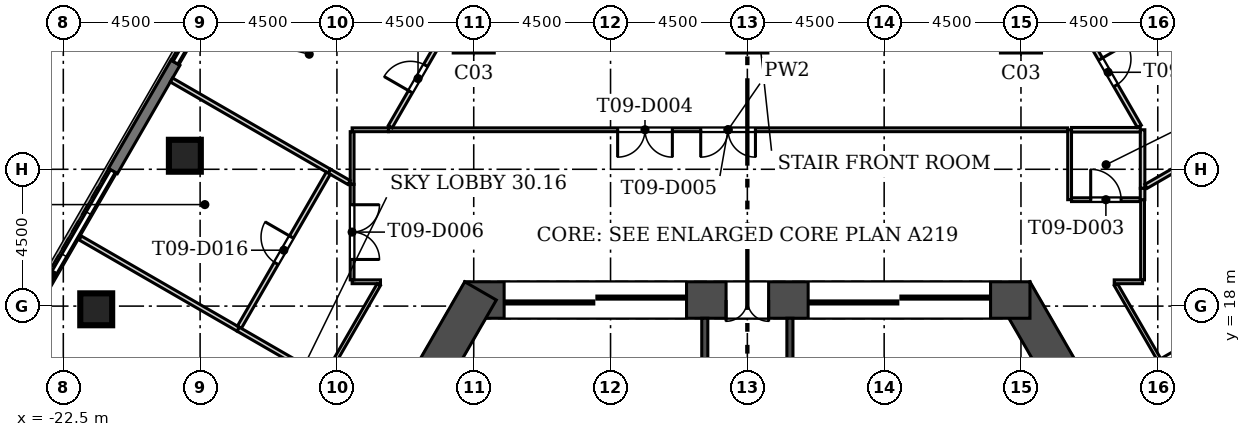
"""IFC4 building model, lengths in metres.
Left out: names, types, materials, properties, quantities, classifications, styles, units other than length and angle.
Written with IfcOpenShell. Run it as: python <this file> out.ifc"""

import sys

from ifc_helpers import new_model, si_unit, direction, frame, frame_2d, origin, origin_2d, place, context, subcontext, project, spatial, rectangle, extrude, element, fill, save


model = new_model("IFC4")
c1 = context("Model", 3, precision=1e-05, world=origin(), true_north=direction((0.0, 1.0)))
c2 = subcontext(c1, "Body", "Model", "MODEL_VIEW")
j1 = project(units=[si_unit("LENGTHUNIT", "METRE"), si_unit("PLANEANGLEUNIT", "RADIAN")], contexts=[c1])
p1 = place(None, origin())
s1 = spatial("IfcSite", under=j1, at=p1, CompositionType="ELEMENT")
p2 = place(p1, origin())
s2 = spatial("IfcBuilding", under=s1, at=p2, CompositionType="ELEMENT")
p3 = place(p2, frame((0.0, 0.0, 137.5)))
s3 = spatial("IfcBuildingStorey", under=s2, at=p3, CompositionType="ELEMENT", Elevation=137.5)
for number, where, z_axis, x_axis in (
    (1, (-18.502, 22.945, 0.0), (0.0, 0.0, 1.0), (1.0, 0.0, 0.0)),
    (2, (-21.417, 17.895, 0.0), (0.0, 0.0, 1.0), (1.0, 0.0, 0.0)),
):
    element("IfcColumn", number, at=place(p3, frame(where, z_axis=z_axis, x_axis=x_axis)), inside=s3, PredefinedType="COLUMN", context=c2, shape_type="SweptSolid", body=[
        extrude(rectangle(XDim=1.05, YDim=1.05, at=origin_2d()), origin(), (0.0, 0.0, 1.0), 5.4),
    ])
p4 = place(p3, frame((13.281, 10.699, 0.0), z_axis=(0.0, 0.0, 1.0), x_axis=(-0.499998513025, 0.866026262288, 0.0)))
e3 = element("IfcWall", 3, at=p4, inside=s3, PredefinedType="SHEAR", context=c2, shape_type="SweptSolid", body=[
    extrude(rectangle(XDim=9.008, YDim=1.2, at=frame_2d((4.504, 0.0))), origin(), (0.0, 0.0, 1.0), 5.4),
])
p5 = place(p3, frame((9.296, 18.2, 0.0), z_axis=(0.0, 0.0, 1.0), x_axis=(-1.0, 0.0, 0.0)))
e4 = element("IfcWall", 4, at=p5, inside=s3, PredefinedType="SHEAR", context=c2, shape_type="SweptSolid", body=[
    extrude(rectangle(XDim=18.592, YDim=1.2, at=frame_2d((9.296, 0.0))), origin(), (0.0, 0.0, 1.0), 5.4),
])
p6 = place(p5, frame((8.596, 0.0, 0.0)))
e5 = element("IfcOpeningElement", 5, at=p6, cuts=e4, PredefinedType="OPENING", context=c2, shape_type="SweptSolid", body=[
    extrude(rectangle(XDim=1.4, YDim=2.1, at=frame_2d((0.7, 1.05))), frame((0.0, 0.61, 0.0), z_axis=(0.0, -1.0, 0.0), x_axis=(1.0, 0.0, 0.0)), (0.0, 0.0, 1.0), 1.22),
])
p7 = place(p5, frame((11.296, 0.0, 0.0)))
e6 = element("IfcOpeningElement", 6, at=p7, cuts=e4, PredefinedType="OPENING", context=c2, shape_type="SweptSolid", body=[
    extrude(rectangle(XDim=6.0, YDim=2.4, at=frame_2d((3.0, 1.2))), frame((0.0, 0.61, 0.0), z_axis=(0.0, -1.0, 0.0), x_axis=(1.0, 0.0, 0.0)), (0.0, 0.0, 1.0), 1.22),
])
p8 = place(p5, frame((1.296, 0.0, 0.0)))
e7 = element("IfcOpeningElement", 7, at=p8, cuts=e4, PredefinedType="OPENING", context=c2, shape_type="SweptSolid", body=[
    extrude(rectangle(XDim=6.0, YDim=2.4, at=frame_2d((3.0, 1.2))), frame((0.0, 0.61, 0.0), z_axis=(0.0, -1.0, 0.0), x_axis=(1.0, 0.0, 0.0)), (0.0, 0.0, 1.0), 1.22),
])
p9 = place(p3, frame((-8.777, 18.5, 0.0), z_axis=(0.0, 0.0, 1.0), x_axis=(-0.499998513025, -0.866026262288, 0.0)))
e8 = element("IfcWall", 8, at=p9, inside=s3, PredefinedType="SHEAR", context=c2, shape_type="SweptSolid", body=[
    extrude(rectangle(XDim=9.008, YDim=1.2, at=frame_2d((4.504, 0.0))), origin(), (0.0, 0.0, 1.0), 5.4),
])
p10 = place(p3, frame((-18.811, 26.004, 0.0), z_axis=(0.0, 0.0, 1.0), x_axis=(-0.499974107589, -0.866040352259, 0.0)))
e9 = element("IfcWall", 9, at=p10, inside=s3, PredefinedType="SOLIDWALL", context=c2, shape_type="SweptSolid", body=[
    extrude(rectangle(XDim=4.115, YDim=0.34, at=frame_2d((2.058, 0.0))), origin(), (0.0, 0.0, 1.0), 5.0),
])
p11 = place(p3, frame((-1.4, 5.85, -0.4), z_axis=(0.0, 0.0, 1.0), x_axis=(0.0, 1.0, 0.0)))
e10 = element("IfcWall", 10, at=p11, inside=s3, PredefinedType="SOLIDWALL", context=c2, shape_type="SweptSolid", body=[
    extrude(rectangle(XDim=11.75, YDim=0.2, at=frame_2d((5.875, 0.0))), origin(), (0.0, 0.0, 1.0), 5.4),
])
p12 = place(p11, frame((5.7, 0.0, 0.4)))
e11 = element("IfcOpeningElement", 11, at=p12, cuts=e10, PredefinedType="OPENING", context=c2, shape_type="SweptSolid", body=[
    extrude(rectangle(XDim=1.4, YDim=2.1, at=frame_2d((0.7, 1.05))), frame((0.0, 0.11, 0.0), z_axis=(0.0, -1.0, 0.0), x_axis=(1.0, 0.0, 0.0)), (0.0, 0.0, 1.0), 0.22),
])
p13 = place(p11, frame((8.3, 0.0, 0.4)))
e12 = element("IfcOpeningElement", 12, at=p13, cuts=e10, PredefinedType="OPENING", context=c2, shape_type="SweptSolid", body=[
    extrude(rectangle(XDim=1.4, YDim=2.1, at=frame_2d((0.7, 1.05))), frame((0.0, 0.11, 0.0), z_axis=(0.0, -1.0, 0.0), x_axis=(1.0, 0.0, 0.0)), (0.0, 0.0, 1.0), 0.22),
])
p14 = place(p11, frame((0.65, 0.0, 0.4)))
e13 = element("IfcOpeningElement", 13, at=p14, cuts=e10, PredefinedType="OPENING", context=c2, shape_type="SweptSolid", body=[
    extrude(rectangle(XDim=1.1, YDim=2.1, at=frame_2d((0.55, 1.05))), frame((0.0, 0.11, 0.0), z_axis=(0.0, -1.0, 0.0), x_axis=(1.0, 0.0, 0.0)), (0.0, 0.0, 1.0), 0.22),
])
p15 = place(p11, frame((3.3, 0.0, 0.4)))
e14 = element("IfcOpeningElement", 14, at=p15, cuts=e10, PredefinedType="OPENING", context=c2, shape_type="SweptSolid", body=[
    extrude(rectangle(XDim=1.0, YDim=2.1, at=frame_2d((0.5, 1.05))), frame((0.0, 0.11, 0.0), z_axis=(0.0, -1.0, 0.0), x_axis=(1.0, 0.0, 0.0)), (0.0, 0.0, 1.0), 0.22),
])
p16 = place(p3, frame((1.4, 5.85, -0.4), z_axis=(0.0, 0.0, 1.0), x_axis=(0.0, 1.0, 0.0)))
e15 = element("IfcWall", 15, at=p16, inside=s3, PredefinedType="SOLIDWALL", context=c2, shape_type="SweptSolid", body=[
    extrude(rectangle(XDim=11.75, YDim=0.2, at=frame_2d((5.875, 0.0))), origin(), (0.0, 0.0, 1.0), 5.4),
])
p17 = place(p16, frame((3.2, 0.0, 0.4)))
e16 = element("IfcOpeningElement", 16, at=p17, cuts=e15, PredefinedType="OPENING", context=c2, shape_type="SweptSolid", body=[
    extrude(rectangle(XDim=1.2, YDim=2.1, at=frame_2d((0.6, 1.05))), frame((0.0, 0.11, 0.0), z_axis=(0.0, -1.0, 0.0), x_axis=(1.0, 0.0, 0.0)), (0.0, 0.0, 1.0), 0.22),
])
p18 = place(p16, frame((5.7, 0.0, 0.4)))
e17 = element("IfcOpeningElement", 17, at=p18, cuts=e15, PredefinedType="OPENING", context=c2, shape_type="SweptSolid", body=[
    extrude(rectangle(XDim=1.4, YDim=2.1, at=frame_2d((0.7, 1.05))), frame((0.0, 0.11, 0.0), z_axis=(0.0, -1.0, 0.0), x_axis=(1.0, 0.0, 0.0)), (0.0, 0.0, 1.0), 0.22),
])
p19 = place(p16, frame((0.65, 0.0, 0.4)))
e18 = element("IfcOpeningElement", 18, at=p19, cuts=e15, PredefinedType="OPENING", context=c2, shape_type="SweptSolid", body=[
    extrude(rectangle(XDim=1.1, YDim=2.1, at=frame_2d((0.55, 1.05))), frame((0.0, 0.11, 0.0), z_axis=(0.0, -1.0, 0.0), x_axis=(1.0, 0.0, 0.0)), (0.0, 0.0, 1.0), 0.22),
])
p20 = place(p3, frame((12.122, 18.706, 0.0), z_axis=(0.0, 0.0, 1.0), x_axis=(0.499989655977, -0.866031375826, 0.0)))
e19 = element("IfcWall", 19, at=p20, inside=s3, PredefinedType="PARTITIONING", context=c2, shape_type="SweptSolid", body=[
    extrude(rectangle(XDim=6.697, YDim=0.125, at=frame_2d((3.348, 0.0))), origin(), (0.0, 0.0, 1.0), 5.0),
])
p21 = place(p20, frame((2.848, 0.0, 0.0)))
e20 = element("IfcOpeningElement", 20, at=p21, cuts=e19, PredefinedType="OPENING", context=c2, shape_type="SweptSolid", body=[
    extrude(rectangle(XDim=1.0, YDim=2.1, at=frame_2d((0.5, 1.05))), frame((0.0, 0.073, 0.0), z_axis=(0.0, -1.0, 0.0), x_axis=(1.0, 0.0, 0.0)), (0.0, 0.0, 1.0), 0.145),
])
p22 = place(p3, frame((10.6, 23.8, 0.0), z_axis=(0.0, 0.0, 1.0), x_axis=(0.0, -1.0, 0.0)))
e21 = element("IfcWall", 21, at=p22, inside=s3, PredefinedType="PARTITIONING", context=c2, shape_type="SweptSolid", body=[
    extrude(rectangle(XDim=2.3, YDim=0.125, at=frame_2d((1.15, 0.0))), origin(), (0.0, 0.0, 1.0), 5.0),
])
p23 = place(p3, frame((10.663, 21.5, 0.0), z_axis=(0.0, 0.0, 1.0), x_axis=(1.0, 0.0, 0.0)))
e22 = element("IfcWall", 22, at=p23, inside=s3, PredefinedType="PARTITIONING", context=c2, shape_type="SweptSolid", body=[
    extrude(rectangle(XDim=2.262, YDim=0.125, at=frame_2d((1.131, 0.0))), origin(), (0.0, 0.0, 1.0), 5.0),
])
p24 = place(p23, frame((0.631, 0.0, 0.0)))
e23 = element("IfcOpeningElement", 23, at=p24, cuts=e22, PredefinedType="OPENING", context=c2, shape_type="SweptSolid", body=[
    extrude(rectangle(XDim=1.0, YDim=2.1, at=frame_2d((0.5, 1.05))), frame((0.0, 0.073, 0.0), z_axis=(0.0, -1.0, 0.0), x_axis=(1.0, 0.0, 0.0)), (0.0, 0.0, 1.0), 0.145),
])
p25 = place(p3, frame((-11.804, 23.8, 0.0), z_axis=(0.0, 0.0, 1.0), x_axis=(1.0, 0.0, 0.0)))
e24 = element("IfcWall", 24, at=p25, inside=s3, PredefinedType="PARTITIONING", context=c2, shape_type="SweptSolid", body=[
    extrude(rectangle(XDim=22.342, YDim=0.125, at=frame_2d((11.171, 0.0))), origin(), (0.0, 0.0, 1.0), 5.0),
])
p26 = place(p25, frame((7.538, 0.0, 0.0)))
e25 = element("IfcOpeningElement", 25, at=p26, cuts=e24, PredefinedType="OPENING", context=c2, shape_type="SweptSolid", body=[
    extrude(rectangle(XDim=1.8, YDim=2.1, at=frame_2d((0.9, 1.05))), frame((0.0, 0.073, 0.0), z_axis=(0.0, -1.0, 0.0), x_axis=(1.0, 0.0, 0.0)), (0.0, 0.0, 1.0), 0.145),
])
p27 = place(p25, frame((10.271, 0.0, 0.0)))
e26 = element("IfcOpeningElement", 26, at=p27, cuts=e24, PredefinedType="OPENING", context=c2, shape_type="SweptSolid", body=[
    extrude(rectangle(XDim=1.8, YDim=2.1, at=frame_2d((0.9, 1.05))), frame((0.0, 0.073, 0.0), z_axis=(0.0, -1.0, 0.0), x_axis=(1.0, 0.0, 0.0)), (0.0, 0.0, 1.0), 0.145),
])
p28 = place(p3, frame((-13.0, 22.006, 0.0), z_axis=(0.0, 0.0, 1.0), x_axis=(0.0, 1.0, 0.0)))
e27 = element("IfcWall", 27, at=p28, inside=s3, PredefinedType="PARTITIONING", context=c2, shape_type="SweptSolid", body=[
    extrude(rectangle(XDim=1.732, YDim=0.125, at=frame_2d((0.866, 0.0))), origin(), (0.0, 0.0, 1.0), 5.0),
])
p29 = place(p3, frame((-13.0, 23.8, 0.0), z_axis=(0.0, 0.0, 1.0), x_axis=(1.0, 0.0, 0.0)))
e28 = element("IfcWall", 28, at=p29, inside=s3, PredefinedType="PARTITIONING", context=c2, shape_type="SweptSolid", body=[
    extrude(rectangle(XDim=1.196, YDim=0.125, at=frame_2d((0.598, 0.0))), origin(), (0.0, 0.0, 1.0), 5.0),
])
p30 = place(p3, frame((-12.067, 18.8, 0.0), z_axis=(0.0, 0.0, 1.0), x_axis=(-1.0, 0.0, 0.0)))
e29 = element("IfcWall", 29, at=p30, inside=s3, PredefinedType="PARTITIONING", context=c2, shape_type="SweptSolid", body=[
    extrude(rectangle(XDim=0.933, YDim=0.125, at=frame_2d((0.466, 0.0))), origin(), (0.0, 0.0, 1.0), 5.0),
])
p31 = place(p3, frame((-13.0, 18.863, 0.0), z_axis=(0.0, 0.0, 1.0), x_axis=(0.0, 1.0, 0.0)))
e30 = element("IfcWall", 30, at=p31, inside=s3, PredefinedType="PARTITIONING", context=c2, shape_type="SweptSolid", body=[
    extrude(rectangle(XDim=3.143, YDim=0.125, at=frame_2d((1.572, 0.0))), origin(), (0.0, 0.0, 1.0), 5.0),
])
p32 = place(p31, frame((0.672, 0.0, 0.0)))
e31 = element("IfcOpeningElement", 31, at=p32, cuts=e30, PredefinedType="OPENING", context=c2, shape_type="SweptSolid", body=[
    extrude(rectangle(XDim=1.8, YDim=2.1, at=frame_2d((0.9, 1.05))), frame((0.0, 0.073, 0.0), z_axis=(0.0, -1.0, 0.0), x_axis=(1.0, 0.0, 0.0)), (0.0, 0.0, 1.0), 0.145),
])
p33 = place(p3, frame((13.0, 21.5, 0.0), z_axis=(0.0, 0.0, 1.0), x_axis=(0.0, -1.0, 0.0)))
e32 = element("IfcWall", 32, at=p33, inside=s3, PredefinedType="PARTITIONING", context=c2, shape_type="SweptSolid", body=[
    extrude(rectangle(XDim=2.637, YDim=0.125, at=frame_2d((1.319, 0.0))), origin(), (0.0, 0.0, 1.0), 5.0),
])
p34 = place(p3, frame((13.0, 18.8, 0.0), z_axis=(0.0, 0.0, 1.0), x_axis=(-1.0, 0.0, 0.0)))
e33 = element("IfcWall", 33, at=p34, inside=s3, PredefinedType="PARTITIONING", context=c2, shape_type="SweptSolid", body=[
    extrude(rectangle(XDim=0.933, YDim=0.125, at=frame_2d((0.466, 0.0))), origin(), (0.0, 0.0, 1.0), 5.0),
])
p35 = place(p3, frame((-16.2, 11.642, 0.0), z_axis=(0.0, 0.0, 1.0), x_axis=(0.499989328978, 0.866031564614, 0.0)))
e34 = element("IfcWall", 34, at=p35, inside=s3, PredefinedType="PARTITIONING", context=c2, shape_type="SweptSolid", body=[
    extrude(rectangle(XDim=8.156, YDim=0.125, at=frame_2d((4.078, 0.0))), origin(), (0.0, 0.0, 1.0), 5.0),
])
p36 = place(p3, frame((13.0, 23.8, 0.0), z_axis=(0.0, 0.0, 1.0), x_axis=(0.0, -1.0, 0.0)))
e35 = element("IfcWall", 35, at=p36, inside=s3, PredefinedType="PARTITIONING", context=c2, shape_type="SweptSolid", body=[
    extrude(rectangle(XDim=1.927, YDim=0.15, at=frame_2d((0.964, 0.0))), origin(), (0.0, 0.0, 1.0), 5.0),
])
p37 = place(p3, frame((10.663, 23.8, 0.0), z_axis=(0.0, 0.0, 1.0), x_axis=(1.0, 0.0, 0.0)))
e36 = element("IfcWall", 36, at=p37, inside=s3, PredefinedType="PARTITIONING", context=c2, shape_type="SweptSolid", body=[
    extrude(rectangle(XDim=2.261, YDim=0.15, at=frame_2d((1.131, 0.0))), origin(), (0.0, 0.0, 1.0), 5.0),
])
p38 = place(p3, frame((13.0, 21.873, 0.0), z_axis=(0.0, 0.0, 1.0), x_axis=(0.0, -1.0, 0.0)))
e37 = element("IfcWall", 37, at=p38, inside=s3, PredefinedType="PARTITIONING", context=c2, shape_type="SweptSolid", body=[
    extrude(rectangle(XDim=0.373, YDim=0.15, at=frame_2d((0.187, 0.0))), origin(), (0.0, 0.0, 1.0), 5.0),
])
p39 = place(p3, frame((12.894, 23.913, 0.0), z_axis=(0.0, 0.0, 1.0), x_axis=(-0.499983290286, 0.866035050927, 0.0)))
e38 = element("IfcWall", 38, at=p39, inside=s3, PredefinedType="PARTITIONING", context=c2, shape_type="SweptSolid", body=[
    extrude(rectangle(XDim=4.105, YDim=0.15, at=frame_2d((2.053, 0.0))), origin(), (0.0, 0.0, 1.0), 5.0),
])
p40 = place(p39, frame((1.552, 0.0, 0.0)))
e39 = element("IfcOpeningElement", 39, at=p40, cuts=e38, PredefinedType="OPENING", context=c2, shape_type="SweptSolid", body=[
    extrude(rectangle(XDim=1.0, YDim=2.1, at=frame_2d((0.5, 1.05))), frame((0.0, 0.085, 0.0), z_axis=(0.0, -1.0, 0.0), x_axis=(1.0, 0.0, 0.0)), (0.0, 0.0, 1.0), 0.17),
])
p41 = place(p3, frame((19.0, 25.337, 0.0), z_axis=(0.0, 0.0, 1.0), x_axis=(-0.866028893315, -0.499993955907, 0.0)))
e40 = element("IfcWall", 40, at=p41, inside=s3, PredefinedType="PARTITIONING", context=c2, shape_type="SweptSolid", body=[
    extrude(rectangle(XDim=6.798, YDim=0.15, at=frame_2d((3.399, 0.0))), origin(), (0.0, 0.0, 1.0), 5.0),
])
p42 = place(p3, frame((-11.746, 23.9, 0.0), z_axis=(0.0, 0.0, 1.0), x_axis=(0.500001750229, 0.866024393287, 0.0)))
e41 = element("IfcWall", 41, at=p42, inside=s3, PredefinedType="PARTITIONING", context=c2, shape_type="SweptSolid", body=[
    extrude(rectangle(XDim=3.657, YDim=0.15, at=frame_2d((1.829, 0.0))), origin(), (0.0, 0.0, 1.0), 5.0),
])
p43 = place(p42, frame((1.329, 0.0, 0.0)))
e42 = element("IfcOpeningElement", 42, at=p43, cuts=e41, PredefinedType="OPENING", context=c2, shape_type="SweptSolid", body=[
    extrude(rectangle(XDim=1.0, YDim=2.1, at=frame_2d((0.5, 1.05))), frame((0.0, 0.085, 0.0), z_axis=(0.0, -1.0, 0.0), x_axis=(1.0, 0.0, 0.0)), (0.0, 0.0, 1.0), 0.17),
])
p44 = place(p3, frame((-13.746, 22.437, 0.0), z_axis=(0.0, 0.0, 1.0), x_axis=(-0.866020924479, 0.500007758305, 0.0)))
e43 = element("IfcWall", 43, at=p44, inside=s3, PredefinedType="PARTITIONING", context=c2, shape_type="SweptSolid", body=[
    extrude(rectangle(XDim=6.0, YDim=0.15, at=frame_2d((3.0, 0.0))), origin(), (0.0, 0.0, 1.0), 5.0),
])
p45 = place(p3, frame((-13.1, 22.064, 0.0), z_axis=(0.0, 0.0, 1.0), x_axis=(-0.866120184914, 0.499835798323, 0.0)))
e44 = element("IfcWall", 44, at=p45, inside=s3, PredefinedType="PARTITIONING", context=c2, shape_type="SweptSolid", body=[
    extrude(rectangle(XDim=0.746, YDim=0.15, at=frame_2d((0.373, 0.0))), origin(), (0.0, 0.0, 1.0), 5.0),
])
p46 = place(p3, frame((-16.746, 17.24, 0.0), z_axis=(0.0, 0.0, 1.0), x_axis=(-0.866020924479, 0.500007758305, 0.0)))
e45 = element("IfcWall", 45, at=p46, inside=s3, PredefinedType="PARTITIONING", context=c2, shape_type="SweptSolid", body=[
    extrude(rectangle(XDim=6.0, YDim=0.15, at=frame_2d((3.0, 0.0))), origin(), (0.0, 0.0, 1.0), 5.0),
])
p47 = place(p3, frame((-13.784, 22.372, 0.0), z_axis=(0.0, 0.0, 1.0), x_axis=(-0.500012662943, -0.866018092707, 0.0)))
e46 = element("IfcWall", 46, at=p47, inside=s3, PredefinedType="PARTITIONING", context=c2, shape_type="SweptSolid", body=[
    extrude(rectangle(XDim=5.85, YDim=0.15, at=frame_2d((2.925, 0.0))), origin(), (0.0, 0.0, 1.0), 5.0),
])
p48 = place(p47, frame((2.425, 0.0, 0.0)))
e47 = element("IfcOpeningElement", 47, at=p48, cuts=e46, PredefinedType="OPENING", context=c2, shape_type="SweptSolid", body=[
    extrude(rectangle(XDim=1.0, YDim=2.1, at=frame_2d((0.5, 1.05))), frame((0.0, 0.085, 0.0), z_axis=(0.0, -1.0, 0.0), x_axis=(1.0, 0.0, 0.0)), (0.0, 0.0, 1.0), 0.17),
])
p49 = place(p3, frame((-16.746, 17.24, 0.0), z_axis=(0.0, 0.0, 1.0), x_axis=(0.866010750942, -0.50002537861, 0.0)))
e48 = element("IfcWall", 48, at=p49, inside=s3, PredefinedType="PARTITIONING", context=c2, shape_type="SweptSolid", body=[
    extrude(rectangle(XDim=2.0, YDim=0.15, at=frame_2d((1.0, 0.0))), origin(), (0.0, 0.0, 1.0), 5.0),
])
p50 = place(p6, origin())
e49 = element("IfcDoor", 49, at=p50, inside=s3, OperationType="DOUBLE_DOOR_SINGLE_SWING", PredefinedType="DOOR", context=c2, shape_type="SweptSolid", body=[
    extrude(rectangle(XDim=1.4, YDim=2.1, at=frame_2d((0.7, 1.05))), frame((0.0, 0.025, 0.0), z_axis=(0.0, -1.0, 0.0), x_axis=(1.0, 0.0, 0.0)), (0.0, 0.0, 1.0), 0.05),
])
fill(e5, e49)
p51 = place(p7, origin())
e50 = element("IfcDoor", 50, at=p51, inside=s3, OperationType="DOUBLE_DOOR_SLIDING", PredefinedType="DOOR", context=c2, shape_type="SweptSolid", body=[
    extrude(rectangle(XDim=6.0, YDim=2.4, at=frame_2d((3.0, 1.2))), frame((0.0, 0.025, 0.0), z_axis=(0.0, -1.0, 0.0), x_axis=(1.0, 0.0, 0.0)), (0.0, 0.0, 1.0), 0.05),
])
fill(e6, e50)
p52 = place(p8, origin())
e51 = element("IfcDoor", 51, at=p52, inside=s3, OperationType="DOUBLE_DOOR_SLIDING", PredefinedType="DOOR", context=c2, shape_type="SweptSolid", body=[
    extrude(rectangle(XDim=6.0, YDim=2.4, at=frame_2d((3.0, 1.2))), frame((0.0, 0.025, 0.0), z_axis=(0.0, -1.0, 0.0), x_axis=(1.0, 0.0, 0.0)), (0.0, 0.0, 1.0), 0.05),
])
fill(e7, e51)
p53 = place(p24, origin())
e52 = element("IfcDoor", 52, at=p53, inside=s3, OperationType="SINGLE_SWING_LEFT", PredefinedType="DOOR", context=c2, shape_type="SweptSolid", body=[
    extrude(rectangle(XDim=1.0, YDim=2.1, at=frame_2d((0.5, 1.05))), frame((0.0, 0.025, 0.0), z_axis=(0.0, -1.0, 0.0), x_axis=(1.0, 0.0, 0.0)), (0.0, 0.0, 1.0), 0.05),
])
fill(e23, e52)
p54 = place(p26, frame((1.8, 0.0, 0.0), z_axis=(0.0, 0.0, 1.0), x_axis=(-1.0, 0.0, 0.0)))
e53 = element("IfcDoor", 53, at=p54, inside=s3, OperationType="DOUBLE_DOOR_SINGLE_SWING", PredefinedType="DOOR", context=c2, shape_type="SweptSolid", body=[
    extrude(rectangle(XDim=1.8, YDim=2.1, at=frame_2d((0.9, 1.05))), frame((0.0, 0.025, 0.0), z_axis=(0.0, -1.0, 0.0), x_axis=(1.0, 0.0, 0.0)), (0.0, 0.0, 1.0), 0.05),
])
fill(e25, e53)
p55 = place(p27, frame((1.8, 0.0, 0.0), z_axis=(0.0, 0.0, 1.0), x_axis=(-1.0, 0.0, 0.0)))
e54 = element("IfcDoor", 54, at=p55, inside=s3, OperationType="DOUBLE_DOOR_SINGLE_SWING", PredefinedType="DOOR", context=c2, shape_type="SweptSolid", body=[
    extrude(rectangle(XDim=1.8, YDim=2.1, at=frame_2d((0.9, 1.05))), frame((0.0, 0.025, 0.0), z_axis=(0.0, -1.0, 0.0), x_axis=(1.0, 0.0, 0.0)), (0.0, 0.0, 1.0), 0.05),
])
fill(e26, e54)
p56 = place(p32, frame((1.8, 0.0, 0.0), z_axis=(0.0, 0.0, 1.0), x_axis=(-1.0, 0.0, 0.0)))
e55 = element("IfcDoor", 55, at=p56, inside=s3, OperationType="DOUBLE_DOOR_SINGLE_SWING", PredefinedType="DOOR", context=c2, shape_type="SweptSolid", body=[
    extrude(rectangle(XDim=1.8, YDim=2.1, at=frame_2d((0.9, 1.05))), frame((0.0, 0.025, 0.0), z_axis=(0.0, -1.0, 0.0), x_axis=(1.0, 0.0, 0.0)), (0.0, 0.0, 1.0), 0.05),
])
fill(e31, e55)
p57 = place(p40, frame((1.0, 0.0, 0.0), z_axis=(0.0, 0.0, 1.0), x_axis=(-1.0, 0.0, 0.0)))
e56 = element("IfcDoor", 56, at=p57, inside=s3, OperationType="SINGLE_SWING_LEFT", PredefinedType="DOOR", context=c2, shape_type="SweptSolid", body=[
    extrude(rectangle(XDim=1.0, YDim=2.1, at=frame_2d((0.5, 1.05))), frame((0.0, 0.025, 0.0), z_axis=(0.0, -1.0, 0.0), x_axis=(1.0, 0.0, 0.0)), (0.0, 0.0, 1.0), 0.05),
])
fill(e39, e56)
p58 = place(p43, origin())
e57 = element("IfcDoor", 57, at=p58, inside=s3, OperationType="SINGLE_SWING_LEFT", PredefinedType="DOOR", context=c2, shape_type="SweptSolid", body=[
    extrude(rectangle(XDim=1.0, YDim=2.1, at=frame_2d((0.5, 1.05))), frame((0.0, 0.025, 0.0), z_axis=(0.0, -1.0, 0.0), x_axis=(1.0, 0.0, 0.0)), (0.0, 0.0, 1.0), 0.05),
])
fill(e42, e57)
p59 = place(p48, frame((1.0, 0.0, 0.0), z_axis=(0.0, 0.0, 1.0), x_axis=(-1.0, 0.0, 0.0)))
e58 = element("IfcDoor", 58, at=p59, inside=s3, OperationType="SINGLE_SWING_RIGHT", PredefinedType="DOOR", context=c2, shape_type="SweptSolid", body=[
    extrude(rectangle(XDim=1.0, YDim=2.1, at=frame_2d((0.5, 1.05))), frame((0.0, 0.025, 0.0), z_axis=(0.0, -1.0, 0.0), x_axis=(1.0, 0.0, 0.0)), (0.0, 0.0, 1.0), 0.05),
])
fill(e47, e58)
save(model, sys.argv[1])
